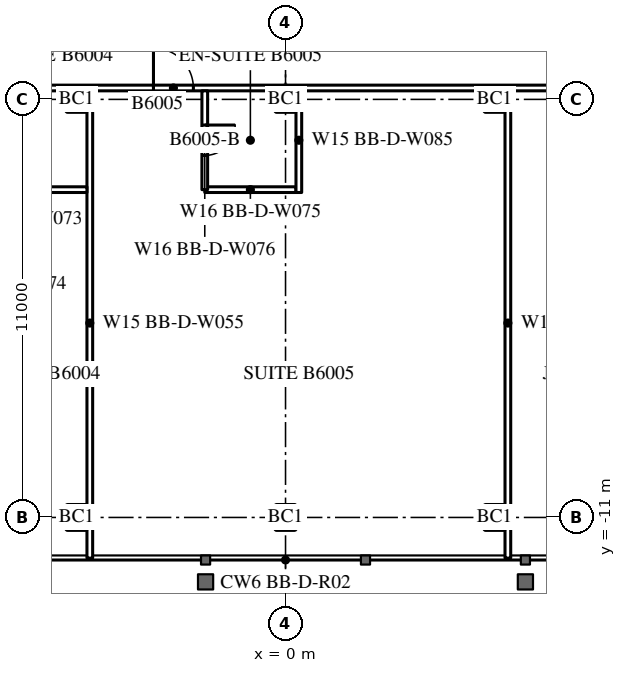
"""IFC4 building model, lengths in metres.
Left out: names, types, materials, properties, quantities, classifications, styles, units other than length and angle.
Written with IfcOpenShell. Run it as: python <this file> out.ifc"""

import sys

from ifc_helpers import new_model, si_unit, direction, frame, frame_2d, origin, origin_2d, place, context, subcontext, project, spatial, rectangle, i_section, extrude, element, fill, save


model = new_model("IFC4")
c1 = context("Model", 3, precision=1e-05, world=origin(), true_north=direction((0.0, 1.0)))
c2 = subcontext(c1, "Body", "Model", "MODEL_VIEW")
j1 = project(units=[si_unit("LENGTHUNIT", "METRE"), si_unit("PLANEANGLEUNIT", "RADIAN")], contexts=[c1])
p1 = place(None, origin())
s1 = spatial("IfcSite", under=j1, at=p1, CompositionType="ELEMENT")
p2 = place(p1, origin())
s2 = spatial("IfcBuilding", under=s1, at=p2, CompositionType="ELEMENT")
p3 = place(p2, frame((0.0, 0.0, 226.1)))
s3 = spatial("IfcBuildingStorey", under=s2, at=p3, CompositionType="ELEMENT", Elevation=226.1)
for number, where, z_axis, x_axis in (
    (1, (-5.5, -11.0, 0.0), (0.0, 0.0, 1.0), (1.0, 0.0, 0.0)),
    (2, (0.0, -11.0, 0.0), (0.0, 0.0, 1.0), (1.0, 0.0, 0.0)),
    (3, (5.5, -11.0, 0.0), (0.0, 0.0, 1.0), (1.0, 0.0, 0.0)),
    (4, (-5.5, 0.0, 0.0), (0.0, 0.0, 1.0), (1.0, 0.0, 0.0)),
    (5, (0.0, 0.0, 0.0), (0.0, 0.0, 1.0), (1.0, 0.0, 0.0)),
    (6, (5.5, 0.0, 0.0), (0.0, 0.0, 1.0), (1.0, 0.0, 0.0)),
):
    element("IfcColumn", number, at=place(p3, frame(where, z_axis=z_axis, x_axis=x_axis)), inside=s3, PredefinedType="COLUMN", context=c2, shape_type="SweptSolid", body=[
        extrude(i_section(OverallWidth=0.476, OverallDepth=0.6, WebThickness=0.1, FlangeThickness=0.14, FilletRadius=0.02, at=origin_2d()), origin(), (0.0, 0.0, 1.0), 3.6),
    ])
p4 = place(p3, frame((-27.5, 0.3, 0.0), z_axis=(0.0, 0.0, 1.0), x_axis=(1.0, 0.0, 0.0)))
e7 = element("IfcWall", 7, at=p4, inside=s3, PredefinedType="PARTITIONING", context=c2, shape_type="SweptSolid", body=[
    extrude(rectangle(XDim=55.0, YDim=0.15, at=frame_2d((27.5, 0.0))), origin(), (0.0, 0.0, 1.0), 2.4),
])
p5 = place(p4, frame((1.575, 0.0, 0.0)))
e8 = element("IfcOpeningElement", 8, at=p5, cuts=e7, PredefinedType="OPENING", context=c2, shape_type="SweptSolid", body=[
    extrude(rectangle(XDim=1.0, YDim=2.2, at=frame_2d((0.5, 1.1))), frame((0.0, 0.085, 0.0), z_axis=(0.0, -1.0, 0.0), x_axis=(1.0, 0.0, 0.0)), (0.0, 0.0, 1.0), 0.17),
])
p6 = place(p4, frame((7.525, 0.0, 0.0)))
e9 = element("IfcOpeningElement", 9, at=p6, cuts=e7, PredefinedType="OPENING", context=c2, shape_type="SweptSolid", body=[
    extrude(rectangle(XDim=1.05, YDim=2.4, at=frame_2d((0.525, 1.2))), frame((0.0, 0.085, 0.0), z_axis=(0.0, -1.0, 0.0), x_axis=(1.0, 0.0, 0.0)), (0.0, 0.0, 1.0), 0.17),
])
p7 = place(p4, frame((18.525, 0.0, 0.0)))
e10 = element("IfcOpeningElement", 10, at=p7, cuts=e7, PredefinedType="OPENING", context=c2, shape_type="SweptSolid", body=[
    extrude(rectangle(XDim=1.05, YDim=2.4, at=frame_2d((0.525, 1.2))), frame((0.0, 0.085, 0.0), z_axis=(0.0, -1.0, 0.0), x_axis=(1.0, 0.0, 0.0)), (0.0, 0.0, 1.0), 0.17),
])
p8 = place(p4, frame((24.025, 0.0, 0.0)))
e11 = element("IfcOpeningElement", 11, at=p8, cuts=e7, PredefinedType="OPENING", context=c2, shape_type="SweptSolid", body=[
    extrude(rectangle(XDim=1.05, YDim=2.4, at=frame_2d((0.525, 1.2))), frame((0.0, 0.085, 0.0), z_axis=(0.0, -1.0, 0.0), x_axis=(1.0, 0.0, 0.0)), (0.0, 0.0, 1.0), 0.17),
])
p9 = place(p4, frame((35.025, 0.0, 0.0)))
e12 = element("IfcOpeningElement", 12, at=p9, cuts=e7, PredefinedType="OPENING", context=c2, shape_type="SweptSolid", body=[
    extrude(rectangle(XDim=1.05, YDim=2.4, at=frame_2d((0.525, 1.2))), frame((0.0, 0.085, 0.0), z_axis=(0.0, -1.0, 0.0), x_axis=(1.0, 0.0, 0.0)), (0.0, 0.0, 1.0), 0.17),
])
p10 = place(p4, frame((40.525, 0.0, 0.0)))
e13 = element("IfcOpeningElement", 13, at=p10, cuts=e7, PredefinedType="OPENING", context=c2, shape_type="SweptSolid", body=[
    extrude(rectangle(XDim=1.05, YDim=2.4, at=frame_2d((0.525, 1.2))), frame((0.0, 0.085, 0.0), z_axis=(0.0, -1.0, 0.0), x_axis=(1.0, 0.0, 0.0)), (0.0, 0.0, 1.0), 0.17),
])
p11 = place(p4, frame((52.525, 0.0, 0.0)))
e14 = element("IfcOpeningElement", 14, at=p11, cuts=e7, PredefinedType="OPENING", context=c2, shape_type="SweptSolid", body=[
    extrude(rectangle(XDim=1.05, YDim=2.4, at=frame_2d((0.525, 1.2))), frame((0.0, 0.085, 0.0), z_axis=(0.0, -1.0, 0.0), x_axis=(1.0, 0.0, 0.0)), (0.0, 0.0, 1.0), 0.17),
])
for number, where, z_axis, x_axis in (
    (15, (-5.15, -12.07, 0.0), (0.0, 0.0, 1.0), (0.0, 1.0, 0.0)),
    (16, (5.85, -12.07, 0.0), (0.0, 0.0, 1.0), (0.0, 1.0, 0.0)),
):
    element("IfcWall", number, at=place(p3, frame(where, z_axis=z_axis, x_axis=x_axis)), inside=s3, PredefinedType="PARTITIONING", context=c2, shape_type="SweptSolid", body=[
        extrude(rectangle(XDim=12.37, YDim=0.15, at=frame_2d((6.185, 0.0))), origin(), (0.0, 0.0, 1.0), 3.4),
    ])
for number, where, z_axis, x_axis in (
    (17, (-7.625, -2.375, 0.0), (0.0, 0.0, 1.0), (1.0, 0.0, 0.0)),
    (18, (-2.125, -2.375, 0.0), (0.0, 0.0, 1.0), (1.0, 0.0, 0.0)),
):
    element("IfcWall", number, at=place(p3, frame(where, z_axis=z_axis, x_axis=x_axis)), inside=s3, PredefinedType="PARTITIONING", context=c2, shape_type="SweptSolid", body=[
        extrude(rectangle(XDim=2.4, YDim=0.15, at=frame_2d((1.2, 0.0))), origin(), (0.0, 0.0, 1.0), 3.4),
    ])
p12 = place(p3, frame((-2.125, -2.375, 0.0), z_axis=(0.0, 0.0, 1.0), x_axis=(0.0, 1.0, 0.0)))
e19 = element("IfcWall", 19, at=p12, inside=s3, PredefinedType="PARTITIONING", context=c2, shape_type="SweptSolid", body=[
    extrude(rectangle(XDim=2.6, YDim=0.15, at=frame_2d((1.3, 0.0))), origin(), (0.0, 0.0, 1.0), 3.4),
])
p13 = place(p12, frame((0.9, 0.0, 0.0)))
e20 = element("IfcOpeningElement", 20, at=p13, cuts=e19, PredefinedType="OPENING", context=c2, shape_type="SweptSolid", body=[
    extrude(rectangle(XDim=0.8, YDim=2.2, at=frame_2d((0.4, 1.1))), frame((0.0, 0.085, 0.0), z_axis=(0.0, -1.0, 0.0), x_axis=(1.0, 0.0, 0.0)), (0.0, 0.0, 1.0), 0.17),
])
p14 = place(p3, frame((0.35, -2.45, 0.0), z_axis=(0.0, 0.0, 1.0), x_axis=(0.0, 1.0, 0.0)))
e21 = element("IfcWall", 21, at=p14, inside=s3, PredefinedType="PARTITIONING", context=c2, shape_type="SweptSolid", body=[
    extrude(rectangle(XDim=2.75, YDim=0.15, at=frame_2d((1.375, 0.0))), origin(), (0.0, 0.0, 1.0), 3.4),
])
p15 = place(p13, origin())
e22 = element("IfcDoor", 22, at=p15, inside=s3, OperationType="SINGLE_SWING_RIGHT", PredefinedType="DOOR", context=c2, shape_type="SweptSolid", body=[
    extrude(rectangle(XDim=0.8, YDim=2.2, at=frame_2d((0.4, 1.1))), frame((0.0, 0.025, 0.0), z_axis=(0.0, -1.0, 0.0), x_axis=(1.0, 0.0, 0.0)), (0.0, 0.0, 1.0), 0.05),
])
fill(e20, e22)
p16 = place(p8, origin())
e23 = element("IfcDoor", 23, at=p16, inside=s3, OperationType="SINGLE_SWING_LEFT", PredefinedType="DOOR", context=c2, shape_type="SweptSolid", body=[
    extrude(rectangle(XDim=1.05, YDim=2.4, at=frame_2d((0.525, 1.2))), frame((0.0, 0.025, 0.0), z_axis=(0.0, -1.0, 0.0), x_axis=(1.0, 0.0, 0.0)), (0.0, 0.0, 1.0), 0.05),
])
fill(e11, e23)
save(model, sys.argv[1])
